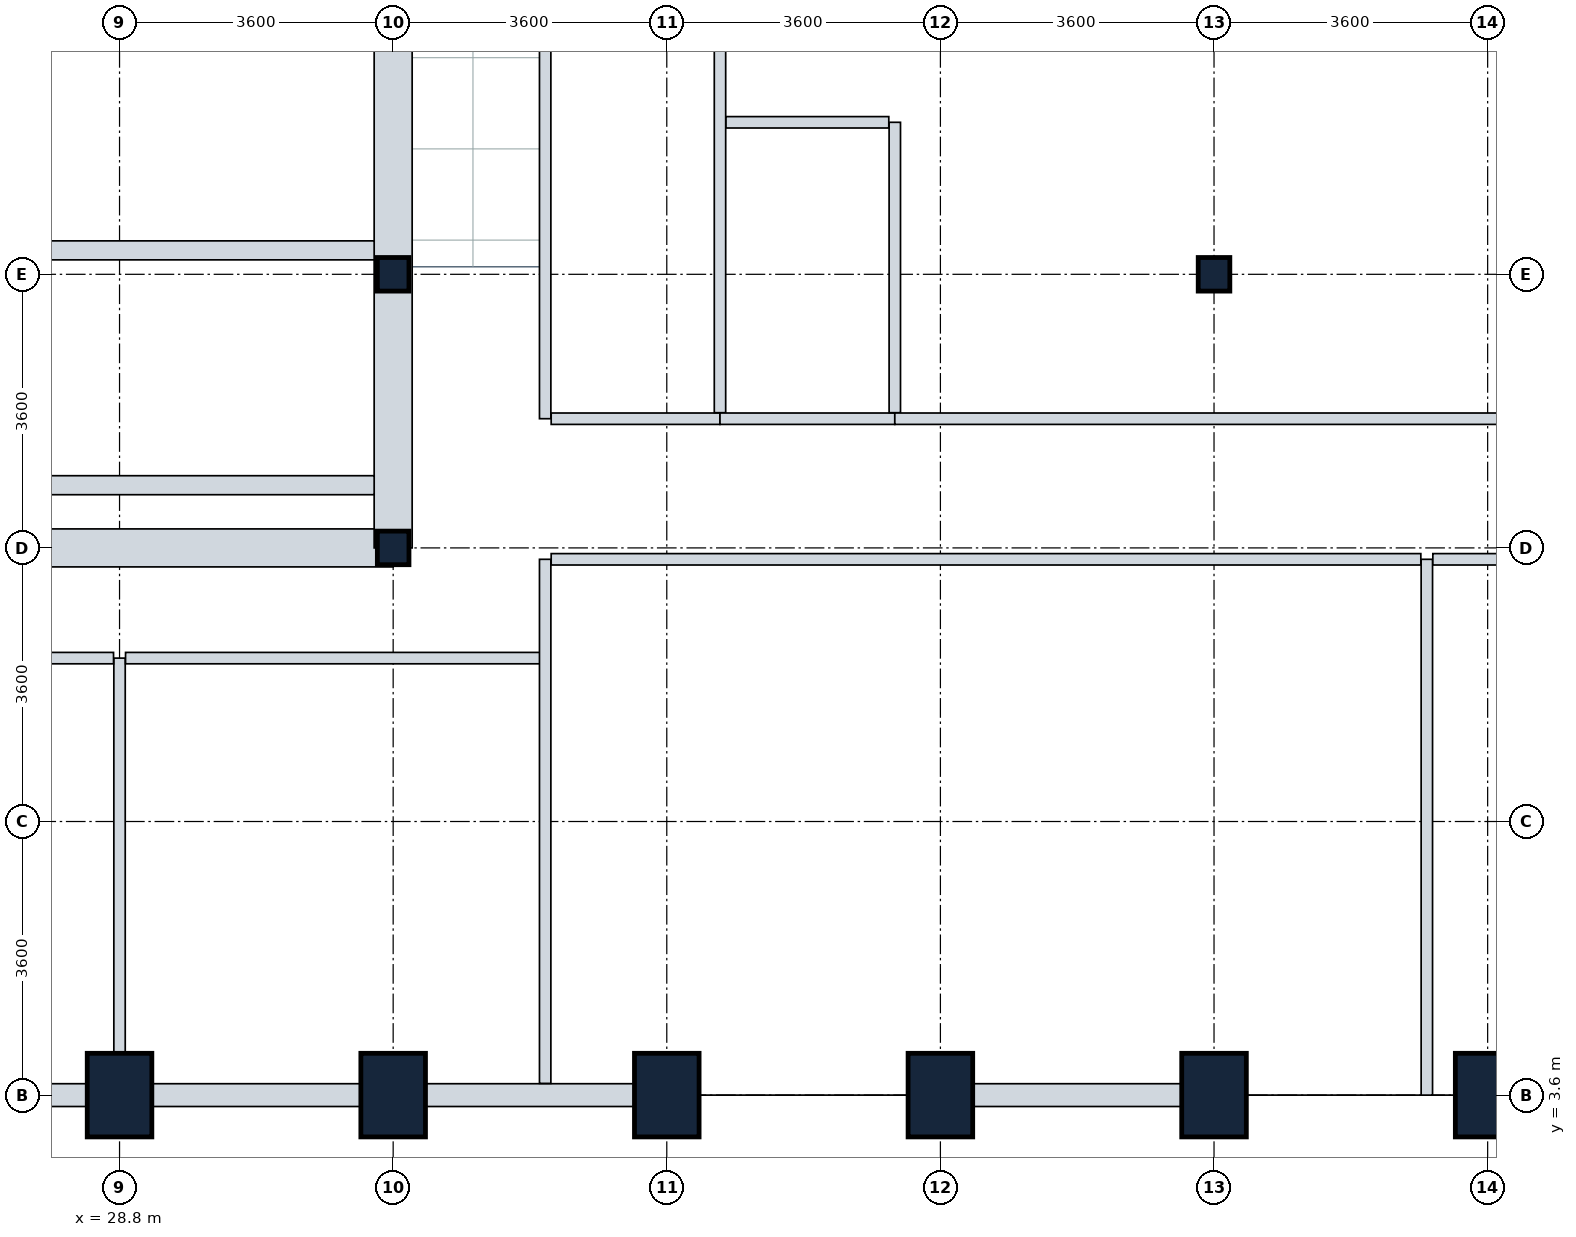
"""IFC4 building model, lengths in metres.
Left out: names, types, materials, properties, quantities, classifications, styles, units other than length and angle.
Written with IfcOpenShell. Run it as: python <this file> out.ifc"""

import sys

from ifc_helpers import new_model, si_unit, direction, frame, frame_2d, origin, origin_2d, place, context, subcontext, project, spatial, rectangle, i_section, extrude, element, fill, save


model = new_model("IFC4")
c1 = context("Model", 3, precision=1e-05, world=origin(), true_north=direction((0.0, 1.0)))
c2 = subcontext(c1, "Body", "Model", "MODEL_VIEW")
j1 = project(units=[si_unit("LENGTHUNIT", "METRE"), si_unit("PLANEANGLEUNIT", "RADIAN")], contexts=[c1])
p1 = place(None, origin())
s1 = spatial("IfcSite", under=j1, at=p1, CompositionType="ELEMENT")
p2 = place(p1, origin())
s2 = spatial("IfcBuilding", under=s1, at=p2, CompositionType="ELEMENT")
p3 = place(p2, frame((0.0, 0.0, 115.2)))
s3 = spatial("IfcBuildingStorey", under=s2, at=p3, CompositionType="ELEMENT", Elevation=115.2)
for number, where, z_axis, x_axis in (
    (1, (28.8, 3.6, 0.0), (0.0, 0.0, 1.0), (1.0, 0.0, 0.0)),
    (2, (32.4, 3.6, 0.0), (0.0, 0.0, 1.0), (1.0, 0.0, 0.0)),
):
    element("IfcColumn", number, at=place(p3, frame(where, z_axis=z_axis, x_axis=x_axis)), inside=s3, PredefinedType="COLUMN", context=c2, shape_type="SweptSolid", body=[
        extrude(rectangle(XDim=0.85, YDim=1.1, at=origin_2d()), origin(), (0.0, 0.0, 1.0), 4.8),
    ])
for number, where, z_axis, x_axis in (
    (3, (32.4, 10.8, 0.0), (0.0, 0.0, 1.0), (1.0, 0.0, 0.0)),
    (4, (32.4, 14.4, 0.0), (0.0, 0.0, 1.0), (1.0, 0.0, 0.0)),
):
    element("IfcColumn", number, at=place(p3, frame(where, z_axis=z_axis, x_axis=x_axis)), inside=s3, PredefinedType="COLUMN", context=c2, shape_type="SweptSolid", body=[
        extrude(i_section(OverallWidth=0.416, OverallDepth=0.442, WebThickness=0.025, FlangeThickness=0.041, FilletRadius=0.015, at=origin_2d()), origin(), (0.0, 0.0, 1.0), 4.8),
    ])
for number, where, z_axis, x_axis in (
    (5, (36.0, 3.6, 0.0), (0.0, 0.0, 1.0), (1.0, 0.0, 0.0)),
    (6, (39.6, 3.6, 0.0), (0.0, 0.0, 1.0), (1.0, 0.0, 0.0)),
    (7, (43.2, 3.6, 0.0), (0.0, 0.0, 1.0), (1.0, 0.0, 0.0)),
):
    element("IfcColumn", number, at=place(p3, frame(where, z_axis=z_axis, x_axis=x_axis)), inside=s3, PredefinedType="COLUMN", context=c2, shape_type="SweptSolid", body=[
        extrude(rectangle(XDim=0.85, YDim=1.1, at=origin_2d()), origin(), (0.0, 0.0, 1.0), 4.8),
    ])
p4 = place(p3, frame((43.2, 14.4, 0.0), z_axis=(0.0, 0.0, 1.0), x_axis=(1.0, 0.0, 0.0)))
e8 = element("IfcColumn", 8, at=p4, inside=s3, PredefinedType="COLUMN", context=c2, shape_type="SweptSolid", body=[
    extrude(i_section(OverallWidth=0.416, OverallDepth=0.442, WebThickness=0.025, FlangeThickness=0.041, FilletRadius=0.015, at=origin_2d()), origin(), (0.0, 0.0, 1.0), 4.8),
])
p5 = place(p3, frame((46.8, 3.6, 0.0), z_axis=(0.0, 0.0, 1.0), x_axis=(1.0, 0.0, 0.0)))
e9 = element("IfcColumn", 9, at=p5, inside=s3, PredefinedType="COLUMN", context=c2, shape_type="SweptSolid", body=[
    extrude(rectangle(XDim=0.85, YDim=1.1, at=origin_2d()), origin(), (0.0, 0.0, 1.0), 4.8),
])
p6 = place(p3, frame((28.8, 3.6, 0.0), z_axis=(0.0, 0.0, 1.0), x_axis=(-1.0, 0.0, 0.0)))
e10 = element("IfcWall", 10, at=p6, inside=s3, PredefinedType="STANDARD", context=c2, shape_type="SweptSolid", body=[
    extrude(rectangle(XDim=3.6, YDim=0.3, at=frame_2d((1.8, 0.0))), origin(), (0.0, 0.0, 1.0), 3.93),
])
p7 = place(p3, frame((32.4, 3.6, 0.0), z_axis=(0.0, 0.0, 1.0), x_axis=(-1.0, 0.0, 0.0)))
e11 = element("IfcWall", 11, at=p7, inside=s3, PredefinedType="STANDARD", context=c2, shape_type="SweptSolid", body=[
    extrude(rectangle(XDim=3.6, YDim=0.3, at=frame_2d((1.8, 0.0))), origin(), (0.0, 0.0, 1.0), 3.93),
])
p8 = place(p3, frame((36.0, 3.6, 0.0), z_axis=(0.0, 0.0, 1.0), x_axis=(-1.0, 0.0, 0.0)))
e12 = element("IfcWall", 12, at=p8, inside=s3, PredefinedType="STANDARD", context=c2, shape_type="SweptSolid", body=[
    extrude(rectangle(XDim=3.6, YDim=0.3, at=frame_2d((1.8, 0.0))), origin(), (0.0, 0.0, 1.0), 3.93),
])
for number, where, z_axis, x_axis in (
    (13, (43.2, 3.6, 0.0), (0.0, 0.0, 1.0), (-1.0, 0.0, 0.0)),
    (14, (50.4, 3.6, 0.0), (0.0, 0.0, 1.0), (-1.0, 0.0, 0.0)),
):
    element("IfcWall", number, at=place(p3, frame(where, z_axis=z_axis, x_axis=x_axis)), inside=s3, PredefinedType="STANDARD", context=c2, shape_type="SweptSolid", body=[
        extrude(rectangle(XDim=3.6, YDim=0.3, at=frame_2d((1.8, 0.0))), origin(), (0.0, 0.0, 1.0), 3.93),
    ])
p9 = place(p3, frame((14.4, 10.8, 0.0), z_axis=(0.0, 0.0, 1.0), x_axis=(1.0, 0.0, 0.0)))
e15 = element("IfcWall", 15, at=p9, inside=s3, PredefinedType="SHEAR", context=c2, shape_type="SweptSolid", body=[
    extrude(rectangle(XDim=18.0, YDim=0.5, at=frame_2d((9.0, 0.0))), origin(), (0.0, 0.0, 1.0), 4.55),
])
p10 = place(p3, frame((32.4, 10.8, 0.0), z_axis=(0.0, 0.0, 1.0), x_axis=(0.0, 1.0, 0.0)))
e16 = element("IfcWall", 16, at=p10, inside=s3, PredefinedType="SHEAR", context=c2, shape_type="SweptSolid", body=[
    extrude(rectangle(XDim=14.4, YDim=0.5, at=frame_2d((7.2, 0.0))), origin(), (0.0, 0.0, 1.0), 4.55),
])
p11 = place(p10, frame((4.35, 0.0, 0.0)))
e17 = element("IfcOpeningElement", 17, at=p11, cuts=e16, PredefinedType="OPENING", context=c2, shape_type="SweptSolid", body=[
    extrude(rectangle(XDim=1.2, YDim=2.1, at=frame_2d((0.6, 1.05))), frame((0.0, 0.26, 0.0), z_axis=(0.0, -1.0, 0.0), x_axis=(1.0, 0.0, 0.0)), (0.0, 0.0, 1.0), 0.52),
])
p12 = place(p10, frame((10.0, 0.0, 0.0)))
e18 = element("IfcOpeningElement", 18, at=p12, cuts=e16, PredefinedType="OPENING", context=c2, shape_type="SweptSolid", body=[
    extrude(rectangle(XDim=1.2, YDim=2.1, at=frame_2d((0.6, 1.05))), frame((0.0, 0.26, 0.0), z_axis=(0.0, -1.0, 0.0), x_axis=(1.0, 0.0, 0.0)), (0.0, 0.0, 1.0), 0.52),
])
p13 = place(p3, frame((23.35, 11.625, 0.0), z_axis=(0.0, 0.0, 1.0), x_axis=(1.0, 0.0, 0.0)))
e19 = element("IfcWall", 19, at=p13, inside=s3, PredefinedType="SHEAR", context=c2, shape_type="SweptSolid", body=[
    extrude(rectangle(XDim=8.8, YDim=0.25, at=frame_2d((4.4, 0.0))), origin(), (0.0, 0.0, 1.0), 4.55),
])
p14 = place(p3, frame((23.35, 14.715, 0.0), z_axis=(0.0, 0.0, 1.0), x_axis=(1.0, 0.0, 0.0)))
e20 = element("IfcWall", 20, at=p14, inside=s3, PredefinedType="SHEAR", context=c2, shape_type="SweptSolid", body=[
    extrude(rectangle(XDim=8.8, YDim=0.25, at=frame_2d((4.4, 0.0))), origin(), (0.0, 0.0, 1.0), 4.55),
])
p15 = place(p14, frame((6.775, 0.0, 0.0)))
e21 = element("IfcOpeningElement", 21, at=p15, cuts=e20, PredefinedType="OPENING", context=c2, shape_type="SweptSolid", body=[
    extrude(rectangle(XDim=1.1, YDim=2.1, at=frame_2d((0.55, 1.05))), frame((0.0, 0.135, 0.0), z_axis=(0.0, -1.0, 0.0), x_axis=(1.0, 0.0, 0.0)), (0.0, 0.0, 1.0), 0.27),
])
p16 = place(p3, frame((34.4, 12.5, 0.0), z_axis=(0.0, 0.0, 1.0), x_axis=(0.0, 1.0, 0.0)))
e22 = element("IfcWall", 22, at=p16, inside=s3, PredefinedType="PARTITIONING", context=c2, shape_type="SweptSolid", body=[
    extrude(rectangle(XDim=12.7, YDim=0.15, at=frame_2d((6.35, 0.0))), origin(), (0.0, 0.0, 1.0), 3.93),
])
p17 = place(p3, frame((34.479, 12.5, 0.0), z_axis=(0.0, 0.0, 1.0), x_axis=(1.0, 0.0, 0.0)))
e23 = element("IfcWall", 23, at=p17, inside=s3, PredefinedType="PARTITIONING", context=c2, shape_type="SweptSolid", body=[
    extrude(rectangle(XDim=2.221, YDim=0.15, at=frame_2d((1.11, 0.0))), origin(), (0.0, 0.0, 1.0), 4.08),
])
p18 = place(p17, frame((0.674, 0.0, 0.0)))
e24 = element("IfcOpeningElement", 24, at=p18, cuts=e23, PredefinedType="OPENING", context=c2, shape_type="SweptSolid", body=[
    extrude(rectangle(XDim=0.85, YDim=2.1, at=frame_2d((0.425, 1.05))), frame((0.0, 0.085, 0.0), z_axis=(0.0, -1.0, 0.0), x_axis=(1.0, 0.0, 0.0)), (0.0, 0.0, 1.0), 0.17),
])
p19 = place(p3, frame((36.7, 12.579, 0.0), z_axis=(0.0, 0.0, 1.0), x_axis=(0.0, 1.0, 0.0)))
e25 = element("IfcWall", 25, at=p19, inside=s3, PredefinedType="PARTITIONING", context=c2, shape_type="SweptSolid", body=[
    extrude(rectangle(XDim=12.467, YDim=0.15, at=frame_2d((6.233, 0.0))), origin(), (0.0, 0.0, 1.0), 3.93),
])
p20 = place(p3, frame((36.7, 12.5, 0.0), z_axis=(0.0, 0.0, 1.0), x_axis=(1.0, 0.0, 0.0)))
e26 = element("IfcWall", 26, at=p20, inside=s3, PredefinedType="PARTITIONING", context=c2, shape_type="SweptSolid", body=[
    extrude(rectangle(XDim=2.3, YDim=0.15, at=frame_2d((1.15, 0.0))), origin(), (0.0, 0.0, 1.0), 4.535),
])
p21 = place(p20, frame((0.697, 0.0, 0.0)))
e27 = element("IfcOpeningElement", 27, at=p21, cuts=e26, PredefinedType="OPENING", context=c2, shape_type="SweptSolid", body=[
    extrude(rectangle(XDim=0.85, YDim=2.1, at=frame_2d((0.425, 1.05))), frame((0.0, 0.085, 0.0), z_axis=(0.0, -1.0, 0.0), x_axis=(1.0, 0.0, 0.0)), (0.0, 0.0, 1.0), 0.17),
])
p22 = place(p3, frame((39.0, 12.579, 0.0), z_axis=(0.0, 0.0, 1.0), x_axis=(0.0, 1.0, 0.0)))
e28 = element("IfcWall", 28, at=p22, inside=s3, PredefinedType="PARTITIONING", context=c2, shape_type="SweptSolid", body=[
    extrude(rectangle(XDim=3.821, YDim=0.15, at=frame_2d((1.91, 0.0))), origin(), (0.0, 0.0, 1.0), 4.08),
])
p23 = place(p3, frame((36.779, 16.4, 0.0), z_axis=(0.0, 0.0, 1.0), x_axis=(1.0, 0.0, 0.0)))
e29 = element("IfcWall", 29, at=p23, inside=s3, PredefinedType="PARTITIONING", context=c2, shape_type="SweptSolid", body=[
    extrude(rectangle(XDim=2.142, YDim=0.15, at=frame_2d((1.071, 0.0))), origin(), (0.0, 0.0, 1.0), 4.535),
])
p24 = place(p3, frame((28.8, 9.35, 0.0), z_axis=(0.0, 0.0, 1.0), x_axis=(0.0, -1.0, 0.0)))
e30 = element("IfcWall", 30, at=p24, inside=s3, PredefinedType="PARTITIONING", context=c2, shape_type="SweptSolid", body=[
    extrude(rectangle(XDim=5.596, YDim=0.15, at=frame_2d((2.798, 0.0))), origin(), (0.0, 0.0, 1.0), 4.535),
])
p25 = place(p3, frame((13.08, 9.35, 0.0), z_axis=(0.0, 0.0, 1.0), x_axis=(1.0, 0.0, 0.0)))
e31 = element("IfcWall", 31, at=p25, inside=s3, PredefinedType="PARTITIONING", context=c2, shape_type="SweptSolid", body=[
    extrude(rectangle(XDim=15.641, YDim=0.15, at=frame_2d((7.82, 0.0))), origin(), (0.0, 0.0, 1.0), 4.08),
])
p26 = place(p25, frame((4.706, 0.0, 0.0)))
e32 = element("IfcOpeningElement", 32, at=p26, cuts=e31, PredefinedType="OPENING", context=c2, shape_type="SweptSolid", body=[
    extrude(rectangle(XDim=1.0, YDim=2.1, at=frame_2d((0.5, 1.05))), frame((0.0, 0.085, 0.0), z_axis=(0.0, -1.0, 0.0), x_axis=(1.0, 0.0, 0.0)), (0.0, 0.0, 1.0), 0.17),
])
p27 = place(p3, frame((28.879, 9.35, 0.0), z_axis=(0.0, 0.0, 1.0), x_axis=(1.0, 0.0, 0.0)))
e33 = element("IfcWall", 33, at=p27, inside=s3, PredefinedType="PARTITIONING", context=c2, shape_type="SweptSolid", body=[
    extrude(rectangle(XDim=5.521, YDim=0.15, at=frame_2d((2.76, 0.0))), origin(), (0.0, 0.0, 1.0), 4.535),
])
p28 = place(p27, frame((0.36, 0.0, 0.0)))
e34 = element("IfcOpeningElement", 34, at=p28, cuts=e33, PredefinedType="OPENING", context=c2, shape_type="SweptSolid", body=[
    extrude(rectangle(XDim=1.0, YDim=2.1, at=frame_2d((0.5, 1.05))), frame((0.0, 0.085, 0.0), z_axis=(0.0, -1.0, 0.0), x_axis=(1.0, 0.0, 0.0)), (0.0, 0.0, 1.0), 0.17),
])
p29 = place(p3, frame((34.4, 3.754, 0.0), z_axis=(0.0, 0.0, 1.0), x_axis=(0.0, 1.0, 0.0)))
e35 = element("IfcWall", 35, at=p29, inside=s3, PredefinedType="PARTITIONING", context=c2, shape_type="SweptSolid", body=[
    extrude(rectangle(XDim=6.896, YDim=0.15, at=frame_2d((3.448, 0.0))), origin(), (0.0, 0.0, 1.0), 3.93),
])
p30 = place(p3, frame((46.0, 3.6, 0.0), z_axis=(0.0, 0.0, 1.0), x_axis=(0.0, 1.0, 0.0)))
e36 = element("IfcWall", 36, at=p30, inside=s3, PredefinedType="PARTITIONING", context=c2, shape_type="SweptSolid", body=[
    extrude(rectangle(XDim=7.05, YDim=0.15, at=frame_2d((3.525, 0.0))), origin(), (0.0, 0.0, 1.0), 3.93),
])
p31 = place(p3, frame((34.479, 10.65, 0.0), z_axis=(0.0, 0.0, 1.0), x_axis=(1.0, 0.0, 0.0)))
e37 = element("IfcWall", 37, at=p31, inside=s3, PredefinedType="PARTITIONING", context=c2, shape_type="SweptSolid", body=[
    extrude(rectangle(XDim=11.442, YDim=0.15, at=frame_2d((5.721, 0.0))), origin(), (0.0, 0.0, 1.0), 4.08),
])
p32 = place(p31, frame((5.221, 0.0, 0.0)))
e38 = element("IfcOpeningElement", 38, at=p32, cuts=e37, PredefinedType="OPENING", context=c2, shape_type="SweptSolid", body=[
    extrude(rectangle(XDim=1.0, YDim=2.1, at=frame_2d((0.5, 1.05))), frame((0.0, 0.085, 0.0), z_axis=(0.0, -1.0, 0.0), x_axis=(1.0, 0.0, 0.0)), (0.0, 0.0, 1.0), 0.17),
])
p33 = place(p3, frame((46.079, 10.65, 0.0), z_axis=(0.0, 0.0, 1.0), x_axis=(1.0, 0.0, 0.0)))
e39 = element("IfcWall", 39, at=p33, inside=s3, PredefinedType="PARTITIONING", context=c2, shape_type="SweptSolid", body=[
    extrude(rectangle(XDim=11.367, YDim=0.15, at=frame_2d((5.684, 0.0))), origin(), (0.0, 0.0, 1.0), 3.93),
])
p34 = place(p33, frame((5.221, 0.0, 0.0)))
e40 = element("IfcOpeningElement", 40, at=p34, cuts=e39, PredefinedType="OPENING", context=c2, shape_type="SweptSolid", body=[
    extrude(rectangle(XDim=1.0, YDim=2.1, at=frame_2d((0.5, 1.05))), frame((0.0, 0.085, 0.0), z_axis=(0.0, -1.0, 0.0), x_axis=(1.0, 0.0, 0.0)), (0.0, 0.0, 1.0), 0.17),
])
p35 = place(p3, frame((39.0, 12.5, 0.0), z_axis=(0.0, 0.0, 1.0), x_axis=(1.0, 0.0, 0.0)))
e41 = element("IfcWall", 41, at=p35, inside=s3, PredefinedType="PARTITIONING", context=c2, shape_type="SweptSolid", body=[
    extrude(rectangle(XDim=9.221, YDim=0.15, at=frame_2d((4.61, 0.0))), origin(), (0.0, 0.0, 1.0), 4.09),
])
p36 = place(p35, frame((6.743, 0.0, 0.0)))
e42 = element("IfcOpeningElement", 42, at=p36, cuts=e41, PredefinedType="OPENING", context=c2, shape_type="SweptSolid", body=[
    extrude(rectangle(XDim=1.0, YDim=2.1, at=frame_2d((0.5, 1.05))), frame((0.0, 0.085, 0.0), z_axis=(0.0, -1.0, 0.0), x_axis=(1.0, 0.0, 0.0)), (0.0, 0.0, 1.0), 0.17),
])
p37 = place(p15, origin())
e43 = element("IfcDoor", 43, at=p37, inside=s3, OperationType="SINGLE_SWING_LEFT", PredefinedType="DOOR", context=c2, shape_type="SweptSolid", body=[
    extrude(rectangle(XDim=1.1, YDim=2.1, at=frame_2d((0.55, 1.05))), frame((0.0, 0.025, 0.0), z_axis=(0.0, -1.0, 0.0), x_axis=(1.0, 0.0, 0.0)), (0.0, 0.0, 1.0), 0.05),
])
fill(e21, e43)
p38 = place(p11, origin())
e44 = element("IfcDoor", 44, at=p38, inside=s3, OperationType="SINGLE_SWING_LEFT", PredefinedType="DOOR", context=c2, shape_type="SweptSolid", body=[
    extrude(rectangle(XDim=1.2, YDim=2.1, at=frame_2d((0.6, 1.05))), frame((0.0, 0.025, 0.0), z_axis=(0.0, -1.0, 0.0), x_axis=(1.0, 0.0, 0.0)), (0.0, 0.0, 1.0), 0.05),
])
fill(e17, e44)
p39 = place(p18, origin())
e45 = element("IfcDoor", 45, at=p39, inside=s3, OperationType="SINGLE_SWING_RIGHT", PredefinedType="DOOR", context=c2, shape_type="SweptSolid", body=[
    extrude(rectangle(XDim=0.85, YDim=2.1, at=frame_2d((0.425, 1.05))), frame((0.0, 0.025, 0.0), z_axis=(0.0, -1.0, 0.0), x_axis=(1.0, 0.0, 0.0)), (0.0, 0.0, 1.0), 0.05),
])
fill(e24, e45)
p40 = place(p21, origin())
e46 = element("IfcDoor", 46, at=p40, inside=s3, OperationType="SINGLE_SWING_RIGHT", PredefinedType="DOOR", context=c2, shape_type="SweptSolid", body=[
    extrude(rectangle(XDim=0.85, YDim=2.1, at=frame_2d((0.425, 1.05))), frame((0.0, 0.025, 0.0), z_axis=(0.0, -1.0, 0.0), x_axis=(1.0, 0.0, 0.0)), (0.0, 0.0, 1.0), 0.05),
])
fill(e27, e46)
p41 = place(p28, origin())
e47 = element("IfcDoor", 47, at=p41, inside=s3, OperationType="SINGLE_SWING_LEFT", PredefinedType="DOOR", context=c2, shape_type="SweptSolid", body=[
    extrude(rectangle(XDim=1.0, YDim=2.1, at=frame_2d((0.5, 1.05))), frame((0.0, 0.025, 0.0), z_axis=(0.0, -1.0, 0.0), x_axis=(1.0, 0.0, 0.0)), (0.0, 0.0, 1.0), 0.05),
])
fill(e34, e47)
p42 = place(p32, origin())
e48 = element("IfcDoor", 48, at=p42, inside=s3, OperationType="SINGLE_SWING_RIGHT", PredefinedType="DOOR", context=c2, shape_type="SweptSolid", body=[
    extrude(rectangle(XDim=1.0, YDim=2.1, at=frame_2d((0.5, 1.05))), frame((0.0, 0.025, 0.0), z_axis=(0.0, -1.0, 0.0), x_axis=(1.0, 0.0, 0.0)), (0.0, 0.0, 1.0), 0.05),
])
fill(e38, e48)
p43 = place(p36, origin())
e49 = element("IfcDoor", 49, at=p43, inside=s3, OperationType="SINGLE_SWING_RIGHT", PredefinedType="DOOR", context=c2, shape_type="SweptSolid", body=[
    extrude(rectangle(XDim=1.0, YDim=2.1, at=frame_2d((0.5, 1.05))), frame((0.0, 0.025, 0.0), z_axis=(0.0, -1.0, 0.0), x_axis=(1.0, 0.0, 0.0)), (0.0, 0.0, 1.0), 0.05),
])
fill(e42, e49)
save(model, sys.argv[1])
